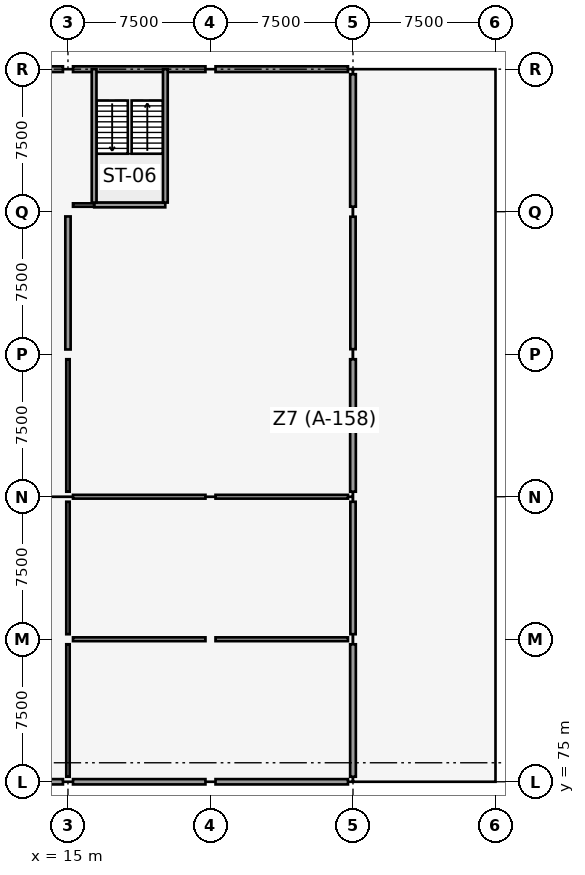
"""IFC4 building model, lengths in metres.
Left out: names, types, materials, properties, quantities, classifications, styles, units other than length and angle.
Written with IfcOpenShell. Run it as: python <this file> out.ifc"""

import sys

from ifc_helpers import new_model, si_unit, direction, frame, frame_2d, origin, origin_2d, place, context, subcontext, project, spatial, rectangle, extrude, element, fill, save


model = new_model("IFC4")
c1 = context("Model", 3, precision=1e-05, world=origin(), true_north=direction((0.0, 1.0)))
c2 = subcontext(c1, "Body", "Model", "MODEL_VIEW")
j1 = project(units=[si_unit("LENGTHUNIT", "METRE"), si_unit("PLANEANGLEUNIT", "RADIAN")], contexts=[c1])
p1 = place(None, origin())
s1 = spatial("IfcSite", under=j1, at=p1, CompositionType="ELEMENT")
p2 = place(p1, origin())
s2 = spatial("IfcBuilding", under=s1, at=p2, CompositionType="ELEMENT")
p3 = place(p2, frame((0.0, 0.0, 17.1)))
s3 = spatial("IfcBuildingStorey", under=s2, at=p3, CompositionType="ELEMENT", Elevation=17.1)
for number, where, z_axis, x_axis in (
    (1, (15.0, 75.0, 0.0), (0.0, 0.0, 1.0), (1.0, 0.0, 0.0)),
    (2, (15.0, 82.5, 0.0), (0.0, 0.0, 1.0), (1.0, 0.0, 0.0)),
    (3, (15.0, 90.0, 0.0), (0.0, 0.0, 1.0), (1.0, 0.0, 0.0)),
    (4, (15.0, 97.5, 0.0), (0.0, 0.0, 1.0), (1.0, 0.0, 0.0)),
    (5, (15.0, 105.0, 0.0), (0.0, 0.0, 1.0), (1.0, 0.0, 0.0)),
    (6, (15.0, 112.5, 0.0), (0.0, 0.0, 1.0), (1.0, 0.0, 0.0)),
    (7, (22.5, 75.0, 0.0), (0.0, 0.0, 1.0), (1.0, 0.0, 0.0)),
    (8, (22.5, 82.5, 0.0), (0.0, 0.0, 1.0), (1.0, 0.0, 0.0)),
    (9, (22.5, 90.0, 0.0), (0.0, 0.0, 1.0), (1.0, 0.0, 0.0)),
    (10, (22.5, 97.5, 0.0), (0.0, 0.0, 1.0), (1.0, 0.0, 0.0)),
    (11, (22.5, 105.0, 0.0), (0.0, 0.0, 1.0), (1.0, 0.0, 0.0)),
    (12, (22.5, 112.5, 0.0), (0.0, 0.0, 1.0), (1.0, 0.0, 0.0)),
    (13, (30.0, 75.0, 0.0), (0.0, 0.0, 1.0), (1.0, 0.0, 0.0)),
    (14, (30.0, 82.5, 0.0), (0.0, 0.0, 1.0), (1.0, 0.0, 0.0)),
    (15, (30.0, 90.0, 0.0), (0.0, 0.0, 1.0), (1.0, 0.0, 0.0)),
    (16, (30.0, 97.5, 0.0), (0.0, 0.0, 1.0), (1.0, 0.0, 0.0)),
    (17, (30.0, 105.0, 0.0), (0.0, 0.0, 1.0), (1.0, 0.0, 0.0)),
    (18, (30.0, 112.5, 0.0), (0.0, 0.0, 1.0), (1.0, 0.0, 0.0)),
):
    element("IfcColumn", number, at=place(p3, frame(where, z_axis=z_axis, x_axis=x_axis)), inside=s3, PredefinedType="COLUMN", context=c2, shape_type="SweptSolid", body=[
        extrude(rectangle(XDim=0.5, YDim=0.5, at=origin_2d()), origin(), (0.0, 0.0, 1.0), 3.9),
    ])
p4 = place(p3, frame((15.0, 97.75, 0.0), z_axis=(0.0, 0.0, 1.0), x_axis=(0.0, 1.0, 0.0)))
e19 = element("IfcWall", 19, at=p4, inside=s3, PredefinedType="SHEAR", context=c2, shape_type="SweptSolid", body=[
    extrude(rectangle(XDim=7.0, YDim=0.28, at=frame_2d((3.5, 0.0))), origin(), (0.0, 0.0, 1.0), 3.6),
])
p5 = place(p3, frame((8.12, 112.5, 0.0), z_axis=(0.0, 0.0, 1.0), x_axis=(1.0, 0.0, 0.0)))
e20 = element("IfcWall", 20, at=p5, inside=s3, PredefinedType="SOLIDWALL", context=c2, shape_type="SweptSolid", body=[
    extrude(rectangle(XDim=6.615, YDim=0.3, at=frame_2d((3.308, 0.0))), origin(), (0.0, 0.0, 1.0), 2.59),
])
p6 = place(p5, frame((2.48, 0.0, 0.6)))
e21 = element("IfcOpeningElement", 21, at=p6, cuts=e20, PredefinedType="OPENING", context=c2, shape_type="SweptSolid", body=[
    extrude(rectangle(XDim=1.3, YDim=1.3, at=frame_2d((0.65, 0.65))), frame((0.0, 0.16, 0.0), z_axis=(0.0, -1.0, 0.0), x_axis=(1.0, 0.0, 0.0)), (0.0, 0.0, 1.0), 0.32),
])
p7 = place(p3, frame((8.12, 75.0, 0.0), z_axis=(0.0, 0.0, 1.0), x_axis=(1.0, 0.0, 0.0)))
e22 = element("IfcWall", 22, at=p7, inside=s3, PredefinedType="SOLIDWALL", context=c2, shape_type="SweptSolid", body=[
    extrude(rectangle(XDim=6.615, YDim=0.28, at=frame_2d((3.308, 0.0))), origin(), (0.0, 0.0, 1.0), 2.59),
])
p8 = place(p7, frame((2.205, 0.0, 0.6)))
e23 = element("IfcOpeningElement", 23, at=p8, cuts=e22, PredefinedType="OPENING", context=c2, shape_type="SweptSolid", body=[
    extrude(rectangle(XDim=1.85, YDim=1.8, at=frame_2d((0.925, 0.9))), frame((0.0, 0.15, 0.0), z_axis=(0.0, -1.0, 0.0), x_axis=(1.0, 0.0, 0.0)), (0.0, 0.0, 1.0), 0.3),
])
p9 = place(p3, frame((15.265, 112.5, 0.0), z_axis=(0.0, 0.0, 1.0), x_axis=(1.0, 0.0, 0.0)))
e24 = element("IfcWall", 24, at=p9, inside=s3, PredefinedType="SOLIDWALL", context=c2, shape_type="SweptSolid", body=[
    extrude(rectangle(XDim=6.97, YDim=0.3, at=frame_2d((3.485, 0.0))), origin(), (0.0, 0.0, 1.0), 2.59),
])
p10 = place(p3, frame((15.265, 75.0, 0.0), z_axis=(0.0, 0.0, 1.0), x_axis=(1.0, 0.0, 0.0)))
e25 = element("IfcWall", 25, at=p10, inside=s3, PredefinedType="SOLIDWALL", context=c2, shape_type="SweptSolid", body=[
    extrude(rectangle(XDim=6.97, YDim=0.28, at=frame_2d((3.485, 0.0))), origin(), (0.0, 0.0, 1.0), 2.59),
])
p11 = place(p10, frame((2.485, 0.0, 0.6)))
e26 = element("IfcOpeningElement", 26, at=p11, cuts=e25, PredefinedType="OPENING", context=c2, shape_type="SweptSolid", body=[
    extrude(rectangle(XDim=2.0, YDim=1.45, at=frame_2d((1.0, 0.725))), frame((0.0, 0.15, 0.0), z_axis=(0.0, -1.0, 0.0), x_axis=(1.0, 0.0, 0.0)), (0.0, 0.0, 1.0), 0.3),
])
p12 = place(p3, frame((22.765, 112.5, 0.0), z_axis=(0.0, 0.0, 1.0), x_axis=(1.0, 0.0, 0.0)))
e27 = element("IfcWall", 27, at=p12, inside=s3, PredefinedType="SOLIDWALL", context=c2, shape_type="SweptSolid", body=[
    extrude(rectangle(XDim=6.97, YDim=0.3, at=frame_2d((3.485, 0.0))), origin(), (0.0, 0.0, 1.0), 2.84),
])
p13 = place(p12, frame((2.685, 0.0, 0.6)))
e28 = element("IfcOpeningElement", 28, at=p13, cuts=e27, PredefinedType="OPENING", context=c2, shape_type="SweptSolid", body=[
    extrude(rectangle(XDim=1.6, YDim=1.3, at=frame_2d((0.8, 0.65))), frame((0.0, 0.16, 0.0), z_axis=(0.0, -1.0, 0.0), x_axis=(1.0, 0.0, 0.0)), (0.0, 0.0, 1.0), 0.32),
])
p14 = place(p3, frame((22.765, 75.0, 0.0), z_axis=(0.0, 0.0, 1.0), x_axis=(1.0, 0.0, 0.0)))
e29 = element("IfcWall", 29, at=p14, inside=s3, PredefinedType="SOLIDWALL", context=c2, shape_type="SweptSolid", body=[
    extrude(rectangle(XDim=6.97, YDim=0.28, at=frame_2d((3.485, 0.0))), origin(), (0.0, 0.0, 1.0), 2.84),
])
p15 = place(p14, frame((2.41, 0.0, 0.6)))
e30 = element("IfcOpeningElement", 30, at=p15, cuts=e29, PredefinedType="OPENING", context=c2, shape_type="SweptSolid", body=[
    extrude(rectangle(XDim=2.15, YDim=1.45, at=frame_2d((1.075, 0.725))), frame((0.0, 0.15, 0.0), z_axis=(0.0, -1.0, 0.0), x_axis=(1.0, 0.0, 0.0)), (0.0, 0.0, 1.0), 0.3),
])
p16 = place(p3, frame((30.0, 75.265, 0.0), z_axis=(0.0, 0.0, 1.0), x_axis=(0.0, 1.0, 0.0)))
e31 = element("IfcWall", 31, at=p16, inside=s3, PredefinedType="SOLIDWALL", context=c2, shape_type="SweptSolid", body=[
    extrude(rectangle(XDim=6.97, YDim=0.3, at=frame_2d((3.485, 0.0))), origin(), (0.0, 0.0, 1.0), 2.74),
])
p17 = place(p16, frame((2.435, 0.0, 0.6)))
e32 = element("IfcOpeningElement", 32, at=p17, cuts=e31, PredefinedType="OPENING", context=c2, shape_type="SweptSolid", body=[
    extrude(rectangle(XDim=2.1, YDim=1.3, at=frame_2d((1.05, 0.65))), frame((0.0, 0.16, 0.0), z_axis=(0.0, -1.0, 0.0), x_axis=(1.0, 0.0, 0.0)), (0.0, 0.0, 1.0), 0.32),
])
p18 = place(p3, frame((30.0, 82.765, 0.0), z_axis=(0.0, 0.0, 1.0), x_axis=(0.0, 1.0, 0.0)))
e33 = element("IfcWall", 33, at=p18, inside=s3, PredefinedType="SOLIDWALL", context=c2, shape_type="SweptSolid", body=[
    extrude(rectangle(XDim=6.97, YDim=0.28, at=frame_2d((3.485, 0.0))), origin(), (0.0, 0.0, 1.0), 2.69),
])
p19 = place(p18, frame((2.735, 0.0, 0.0)))
e34 = element("IfcOpeningElement", 34, at=p19, cuts=e33, PredefinedType="OPENING", context=c2, shape_type="SweptSolid", body=[
    extrude(rectangle(XDim=1.5, YDim=2.15, at=frame_2d((0.75, 1.075))), frame((0.0, 0.15, 0.0), z_axis=(0.0, -1.0, 0.0), x_axis=(1.0, 0.0, 0.0)), (0.0, 0.0, 1.0), 0.3),
])
p20 = place(p3, frame((30.0, 90.265, 0.0), z_axis=(0.0, 0.0, 1.0), x_axis=(0.0, 1.0, 0.0)))
e35 = element("IfcWall", 35, at=p20, inside=s3, PredefinedType="SOLIDWALL", context=c2, shape_type="SweptSolid", body=[
    extrude(rectangle(XDim=6.97, YDim=0.3, at=frame_2d((3.485, 0.0))), origin(), (0.0, 0.0, 1.0), 2.64),
])
p21 = place(p20, frame((2.885, 0.0, 0.6)))
e36 = element("IfcOpeningElement", 36, at=p21, cuts=e35, PredefinedType="OPENING", context=c2, shape_type="SweptSolid", body=[
    extrude(rectangle(XDim=1.2, YDim=1.2, at=frame_2d((0.6, 0.6))), frame((0.0, 0.16, 0.0), z_axis=(0.0, -1.0, 0.0), x_axis=(1.0, 0.0, 0.0)), (0.0, 0.0, 1.0), 0.32),
])
p22 = place(p3, frame((30.0, 97.765, 0.0), z_axis=(0.0, 0.0, 1.0), x_axis=(0.0, 1.0, 0.0)))
e37 = element("IfcWall", 37, at=p22, inside=s3, PredefinedType="SOLIDWALL", context=c2, shape_type="SweptSolid", body=[
    extrude(rectangle(XDim=6.97, YDim=0.28, at=frame_2d((3.485, 0.0))), origin(), (0.0, 0.0, 1.0), 2.64),
])
p23 = place(p22, frame((2.735, 0.0, 0.0)))
e38 = element("IfcOpeningElement", 38, at=p23, cuts=e37, PredefinedType="OPENING", context=c2, shape_type="SweptSolid", body=[
    extrude(rectangle(XDim=1.5, YDim=2.15, at=frame_2d((0.75, 1.075))), frame((0.0, 0.15, 0.0), z_axis=(0.0, -1.0, 0.0), x_axis=(1.0, 0.0, 0.0)), (0.0, 0.0, 1.0), 0.3),
])
p24 = place(p3, frame((30.0, 105.265, 0.0), z_axis=(0.0, 0.0, 1.0), x_axis=(0.0, 1.0, 0.0)))
e39 = element("IfcWall", 39, at=p24, inside=s3, PredefinedType="SOLIDWALL", context=c2, shape_type="SweptSolid", body=[
    extrude(rectangle(XDim=6.97, YDim=0.3, at=frame_2d((3.485, 0.0))), origin(), (0.0, 0.0, 1.0), 2.79),
])
p25 = place(p24, frame((2.585, 0.0, 0.6)))
e40 = element("IfcOpeningElement", 40, at=p25, cuts=e39, PredefinedType="OPENING", context=c2, shape_type="SweptSolid", body=[
    extrude(rectangle(XDim=1.8, YDim=1.2, at=frame_2d((0.9, 0.6))), frame((0.0, 0.16, 0.0), z_axis=(0.0, -1.0, 0.0), x_axis=(1.0, 0.0, 0.0)), (0.0, 0.0, 1.0), 0.32),
])
p26 = place(p3, frame((16.38, 105.355, 0.0), z_axis=(0.0, 0.0, 1.0), x_axis=(1.0, 0.0, 0.0)))
e41 = element("IfcWall", 41, at=p26, inside=s3, PredefinedType="SOLIDWALL", context=c2, shape_type="SweptSolid", body=[
    extrude(rectangle(XDim=3.74, YDim=0.25, at=frame_2d((1.87, 0.0))), origin(), (0.0, 0.0, 1.0), 3.62),
])
p27 = place(p3, frame((16.375, 105.48, 0.0), z_axis=(0.0, 0.0, 1.0), x_axis=(0.0, 1.0, 0.0)))
e42 = element("IfcWall", 42, at=p27, inside=s3, PredefinedType="SOLIDWALL", context=c2, shape_type="SweptSolid", body=[
    extrude(rectangle(XDim=7.02, YDim=0.25, at=frame_2d((3.51, 0.0))), origin(), (0.0, 0.0, 1.0), 3.62),
])
p28 = place(p27, frame((5.47, 0.0, 0.0)))
e43 = element("IfcOpeningElement", 43, at=p28, cuts=e42, PredefinedType="OPENING", context=c2, shape_type="SweptSolid", body=[
    extrude(rectangle(XDim=1.1, YDim=2.15, at=frame_2d((0.55, 1.075))), frame((0.0, 0.135, 0.0), z_axis=(0.0, -1.0, 0.0), x_axis=(1.0, 0.0, 0.0)), (0.0, 0.0, 1.0), 0.27),
])
p29 = place(p3, frame((20.125, 105.48, 0.0), z_axis=(0.0, 0.0, 1.0), x_axis=(0.0, 1.0, 0.0)))
e44 = element("IfcWall", 44, at=p29, inside=s3, PredefinedType="SOLIDWALL", context=c2, shape_type="SweptSolid", body=[
    extrude(rectangle(XDim=7.02, YDim=0.25, at=frame_2d((3.51, 0.0))), origin(), (0.0, 0.0, 1.0), 3.62),
])
p30 = place(p3, frame((15.264, 105.35, 0.0), z_axis=(0.0, 0.0, 1.0), x_axis=(1.0, 0.0, 0.0)))
e45 = element("IfcWall", 45, at=p30, inside=s3, PredefinedType="PARTITIONING", context=c2, shape_type="SweptSolid", body=[
    extrude(rectangle(XDim=1.116, YDim=0.18, at=frame_2d((0.558, 0.0))), origin(), (0.0, 0.0, 1.0), 2.59),
])
for number, where, z_axis, x_axis in (
    (46, (15.264, 82.5, 0.0), (0.0, 0.0, 1.0), (1.0, 0.0, 0.0)),
    (47, (22.764, 82.5, 0.0), (0.0, 0.0, 1.0), (1.0, 0.0, 0.0)),
):
    element("IfcWall", number, at=place(p3, frame(where, z_axis=z_axis, x_axis=x_axis)), inside=s3, PredefinedType="PARTITIONING", context=c2, shape_type="SweptSolid", body=[
        extrude(rectangle(XDim=6.972, YDim=0.2, at=frame_2d((3.486, 0.0))), origin(), (0.0, 0.0, 1.0), 2.54),
    ])
p31 = place(p3, frame((15.264, 90.0, 0.0), z_axis=(0.0, 0.0, 1.0), x_axis=(1.0, 0.0, 0.0)))
e48 = element("IfcWall", 48, at=p31, inside=s3, PredefinedType="PARTITIONING", context=c2, shape_type="SweptSolid", body=[
    extrude(rectangle(XDim=6.972, YDim=0.2, at=frame_2d((3.486, 0.0))), origin(), (0.0, 0.0, 1.0), 2.59),
])
p32 = place(p3, frame((22.764, 90.0, 0.0), z_axis=(0.0, 0.0, 1.0), x_axis=(1.0, 0.0, 0.0)))
e49 = element("IfcWall", 49, at=p32, inside=s3, PredefinedType="PARTITIONING", context=c2, shape_type="SweptSolid", body=[
    extrude(rectangle(XDim=6.972, YDim=0.2, at=frame_2d((3.486, 0.0))), origin(), (0.0, 0.0, 1.0), 2.69),
])
p33 = place(p3, frame((15.0, 75.264, 0.0), z_axis=(0.0, 0.0, 1.0), x_axis=(0.0, 1.0, 0.0)))
e50 = element("IfcWall", 50, at=p33, inside=s3, PredefinedType="PARTITIONING", context=c2, shape_type="SweptSolid", body=[
    extrude(rectangle(XDim=6.972, YDim=0.18, at=frame_2d((3.486, 0.0))), origin(), (0.0, 0.0, 1.0), 2.54),
])
p34 = place(p33, frame((2.786, 0.0, 0.0)))
e51 = element("IfcOpeningElement", 51, at=p34, cuts=e50, PredefinedType="OPENING", context=c2, shape_type="SweptSolid", body=[
    extrude(rectangle(XDim=1.4, YDim=2.14, at=frame_2d((0.7, 1.07))), frame((0.0, 0.1, 0.0), z_axis=(0.0, -1.0, 0.0), x_axis=(1.0, 0.0, 0.0)), (0.0, 0.0, 1.0), 0.2),
])
p35 = place(p3, frame((15.0, 82.764, 0.0), z_axis=(0.0, 0.0, 1.0), x_axis=(0.0, 1.0, 0.0)))
e52 = element("IfcWall", 52, at=p35, inside=s3, PredefinedType="PARTITIONING", context=c2, shape_type="SweptSolid", body=[
    extrude(rectangle(XDim=6.972, YDim=0.18, at=frame_2d((3.486, 0.0))), origin(), (0.0, 0.0, 1.0), 2.54),
])
p36 = place(p35, frame((2.786, 0.0, 0.0)))
e53 = element("IfcOpeningElement", 53, at=p36, cuts=e52, PredefinedType="OPENING", context=c2, shape_type="SweptSolid", body=[
    extrude(rectangle(XDim=1.4, YDim=2.14, at=frame_2d((0.7, 1.07))), frame((0.0, 0.1, 0.0), z_axis=(0.0, -1.0, 0.0), x_axis=(1.0, 0.0, 0.0)), (0.0, 0.0, 1.0), 0.2),
])
p37 = place(p3, frame((15.0, 90.264, 0.0), z_axis=(0.0, 0.0, 1.0), x_axis=(0.0, 1.0, 0.0)))
e54 = element("IfcWall", 54, at=p37, inside=s3, PredefinedType="PARTITIONING", context=c2, shape_type="SweptSolid", body=[
    extrude(rectangle(XDim=6.972, YDim=0.18, at=frame_2d((3.486, 0.0))), origin(), (0.0, 0.0, 1.0), 2.59),
])
p38 = place(p37, frame((2.786, 0.0, 0.0)))
e55 = element("IfcOpeningElement", 55, at=p38, cuts=e54, PredefinedType="OPENING", context=c2, shape_type="SweptSolid", body=[
    extrude(rectangle(XDim=1.4, YDim=2.14, at=frame_2d((0.7, 1.07))), frame((0.0, 0.1, 0.0), z_axis=(0.0, -1.0, 0.0), x_axis=(1.0, 0.0, 0.0)), (0.0, 0.0, 1.0), 0.2),
])
p39 = place(p11, origin())
e56 = element("IfcWindow", 56, at=p39, inside=s3, PartitioningType="SINGLE_PANEL", PredefinedType="WINDOW", context=c2, shape_type="SweptSolid", body=[
    extrude(rectangle(XDim=2.0, YDim=1.45, at=frame_2d((1.0, 0.725))), frame((0.0, 0.03, 0.0), z_axis=(0.0, -1.0, 0.0), x_axis=(1.0, 0.0, 0.0)), (0.0, 0.0, 1.0), 0.06),
])
fill(e26, e56)
p40 = place(p13, origin())
e57 = element("IfcWindow", 57, at=p40, inside=s3, PartitioningType="SINGLE_PANEL", PredefinedType="WINDOW", context=c2, shape_type="SweptSolid", body=[
    extrude(rectangle(XDim=1.6, YDim=1.3, at=frame_2d((0.8, 0.65))), frame((0.0, 0.03, 0.0), z_axis=(0.0, -1.0, 0.0), x_axis=(1.0, 0.0, 0.0)), (0.0, 0.0, 1.0), 0.06),
])
fill(e28, e57)
p41 = place(p15, origin())
e58 = element("IfcWindow", 58, at=p41, inside=s3, PartitioningType="SINGLE_PANEL", PredefinedType="WINDOW", context=c2, shape_type="SweptSolid", body=[
    extrude(rectangle(XDim=2.15, YDim=1.45, at=frame_2d((1.075, 0.725))), frame((0.0, 0.03, 0.0), z_axis=(0.0, -1.0, 0.0), x_axis=(1.0, 0.0, 0.0)), (0.0, 0.0, 1.0), 0.06),
])
fill(e30, e58)
p42 = place(p17, origin())
e59 = element("IfcWindow", 59, at=p42, inside=s3, PartitioningType="SINGLE_PANEL", PredefinedType="WINDOW", context=c2, shape_type="SweptSolid", body=[
    extrude(rectangle(XDim=2.1, YDim=1.3, at=frame_2d((1.05, 0.65))), frame((0.0, 0.03, 0.0), z_axis=(0.0, -1.0, 0.0), x_axis=(1.0, 0.0, 0.0)), (0.0, 0.0, 1.0), 0.06),
])
fill(e32, e59)
p43 = place(p19, frame((1.5, 0.0, 0.0), z_axis=(0.0, 0.0, 1.0), x_axis=(-1.0, 0.0, 0.0)))
e60 = element("IfcDoor", 60, at=p43, inside=s3, OperationType="SINGLE_SWING_LEFT", PredefinedType="DOOR", context=c2, shape_type="SweptSolid", body=[
    extrude(rectangle(XDim=1.5, YDim=2.15, at=frame_2d((0.75, 1.075))), frame((0.0, 0.025, 0.0), z_axis=(0.0, -1.0, 0.0), x_axis=(1.0, 0.0, 0.0)), (0.0, 0.0, 1.0), 0.05),
])
fill(e34, e60)
p44 = place(p21, origin())
e61 = element("IfcWindow", 61, at=p44, inside=s3, PartitioningType="SINGLE_PANEL", PredefinedType="WINDOW", context=c2, shape_type="SweptSolid", body=[
    extrude(rectangle(XDim=1.2, YDim=1.2, at=frame_2d((0.6, 0.6))), frame((0.0, 0.03, 0.0), z_axis=(0.0, -1.0, 0.0), x_axis=(1.0, 0.0, 0.0)), (0.0, 0.0, 1.0), 0.06),
])
fill(e36, e61)
p45 = place(p23, frame((1.5, 0.0, 0.0), z_axis=(0.0, 0.0, 1.0), x_axis=(-1.0, 0.0, 0.0)))
e62 = element("IfcDoor", 62, at=p45, inside=s3, OperationType="SINGLE_SWING_RIGHT", PredefinedType="DOOR", context=c2, shape_type="SweptSolid", body=[
    extrude(rectangle(XDim=1.5, YDim=2.15, at=frame_2d((0.75, 1.075))), frame((0.0, 0.025, 0.0), z_axis=(0.0, -1.0, 0.0), x_axis=(1.0, 0.0, 0.0)), (0.0, 0.0, 1.0), 0.05),
])
fill(e38, e62)
p46 = place(p25, origin())
e63 = element("IfcWindow", 63, at=p46, inside=s3, PartitioningType="SINGLE_PANEL", PredefinedType="WINDOW", context=c2, shape_type="SweptSolid", body=[
    extrude(rectangle(XDim=1.8, YDim=1.2, at=frame_2d((0.9, 0.6))), frame((0.0, 0.03, 0.0), z_axis=(0.0, -1.0, 0.0), x_axis=(1.0, 0.0, 0.0)), (0.0, 0.0, 1.0), 0.06),
])
fill(e40, e63)
p47 = place(p28, origin())
e64 = element("IfcDoor", 64, at=p47, inside=s3, OperationType="SINGLE_SWING_LEFT", PredefinedType="DOOR", context=c2, shape_type="SweptSolid", body=[
    extrude(rectangle(XDim=1.1, YDim=2.15, at=frame_2d((0.55, 1.075))), frame((0.0, 0.025, 0.0), z_axis=(0.0, -1.0, 0.0), x_axis=(1.0, 0.0, 0.0)), (0.0, 0.0, 1.0), 0.05),
])
fill(e43, e64)
p48 = place(p34, origin())
e65 = element("IfcDoor", 65, at=p48, inside=s3, OperationType="SINGLE_SWING_RIGHT", PredefinedType="DOOR", context=c2, shape_type="SweptSolid", body=[
    extrude(rectangle(XDim=1.4, YDim=2.14, at=frame_2d((0.7, 1.07))), frame((0.0, 0.025, 0.0), z_axis=(0.0, -1.0, 0.0), x_axis=(1.0, 0.0, 0.0)), (0.0, 0.0, 1.0), 0.05),
])
fill(e51, e65)
p49 = place(p36, origin())
e66 = element("IfcDoor", 66, at=p49, inside=s3, OperationType="SINGLE_SWING_LEFT", PredefinedType="DOOR", context=c2, shape_type="SweptSolid", body=[
    extrude(rectangle(XDim=1.4, YDim=2.14, at=frame_2d((0.7, 1.07))), frame((0.0, 0.025, 0.0), z_axis=(0.0, -1.0, 0.0), x_axis=(1.0, 0.0, 0.0)), (0.0, 0.0, 1.0), 0.05),
])
fill(e53, e66)
p50 = place(p38, origin())
e67 = element("IfcDoor", 67, at=p50, inside=s3, OperationType="SINGLE_SWING_RIGHT", PredefinedType="DOOR", context=c2, shape_type="SweptSolid", body=[
    extrude(rectangle(XDim=1.4, YDim=2.14, at=frame_2d((0.7, 1.07))), frame((0.0, 0.025, 0.0), z_axis=(0.0, -1.0, 0.0), x_axis=(1.0, 0.0, 0.0)), (0.0, 0.0, 1.0), 0.05),
])
fill(e55, e67)
save(model, sys.argv[1])
